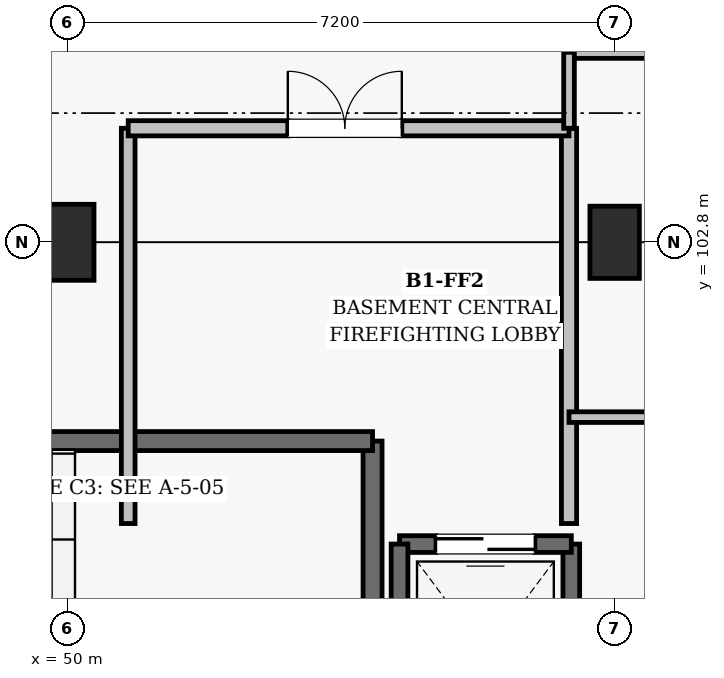
"""IFC4 building model, lengths in metres.
Left out: names, types, materials, properties, quantities, classifications, styles, units other than length and angle.
Written with IfcOpenShell. Run it as: python <this file> out.ifc"""

import sys

from ifc_helpers import new_model, si_unit, direction, frame, frame_2d, origin, origin_2d, place, context, subcontext, project, spatial, rectangle, extrude, element, fill, save


model = new_model("IFC4")
c1 = context("Model", 3, precision=1e-05, world=origin(), true_north=direction((0.0, 1.0)))
c2 = subcontext(c1, "Body", "Model", "MODEL_VIEW")
j1 = project(units=[si_unit("LENGTHUNIT", "METRE"), si_unit("PLANEANGLEUNIT", "RADIAN")], contexts=[c1])
p1 = place(None, origin())
s1 = spatial("IfcSite", under=j1, at=p1, CompositionType="ELEMENT")
p2 = place(p1, origin())
s2 = spatial("IfcBuilding", under=s1, at=p2, CompositionType="ELEMENT")
p3 = place(p2, frame((0.0, 0.0, -4.5)))
s3 = spatial("IfcBuildingStorey", under=s2, at=p3, CompositionType="ELEMENT", Elevation=-4.5)
p4 = place(p3, frame((50.0, 102.8, 0.0), z_axis=(0.0, 0.0, 1.0), x_axis=(1.0, 0.0, 0.0)))
e1 = element("IfcColumn", 1, at=p4, inside=s3, PredefinedType="COLUMN", context=c2, shape_type="SweptSolid", body=[
    extrude(rectangle(XDim=0.7, YDim=1.0, at=origin_2d()), origin(), (0.0, 0.0, 1.0), 4.5),
])
p5 = place(p3, frame((57.2, 102.8, 0.0), z_axis=(0.0, 0.0, 1.0), x_axis=(1.0, 0.0, 0.0)))
e2 = element("IfcColumn", 2, at=p5, inside=s3, PredefinedType="COLUMN", context=c2, shape_type="SweptSolid", body=[
    extrude(rectangle(XDim=0.65, YDim=0.95, at=origin_2d()), origin(), (0.0, 0.0, 1.0), 4.5),
])
p6 = place(p3, frame((54.015, 95.085, 0.0), z_axis=(0.0, 0.0, 1.0), x_axis=(0.0, 1.0, 0.0)))
e3 = element("IfcWall", 3, at=p6, inside=s3, PredefinedType="SHEAR", context=c2, shape_type="SweptSolid", body=[
    extrude(rectangle(XDim=5.1, YDim=0.25, at=frame_2d((2.55, 0.0))), origin(), (0.0, 0.0, 1.0), 4.215),
])
p7 = place(p3, frame((54.015, 100.185, 0.0), z_axis=(0.0, 0.0, 1.0), x_axis=(-1.0, 0.0, 0.0)))
e4 = element("IfcWall", 4, at=p7, inside=s3, PredefinedType="SHEAR", context=c2, shape_type="SweptSolid", body=[
    extrude(rectangle(XDim=10.63, YDim=0.25, at=frame_2d((5.315, 0.0))), origin(), (0.0, 0.0, 1.0), 4.215),
])
p8 = place(p7, frame((8.78, 0.0, 0.0)))
e5 = element("IfcOpeningElement", 5, at=p8, cuts=e4, PredefinedType="OPENING", context=c2, shape_type="SweptSolid", body=[
    extrude(rectangle(XDim=1.2, YDim=2.15, at=frame_2d((0.6, 1.075))), frame((0.0, 0.135, 0.0), z_axis=(0.0, -1.0, 0.0), x_axis=(1.0, 0.0, 0.0)), (0.0, 0.0, 1.0), 0.27),
])
p9 = place(p3, frame((56.63, 95.97, 0.0), z_axis=(0.0, 0.0, 1.0), x_axis=(0.0, 1.0, 0.0)))
e6 = element("IfcWall", 6, at=p9, inside=s3, PredefinedType="SHEAR", context=c2, shape_type="SweptSolid", body=[
    extrude(rectangle(XDim=2.86, YDim=0.22, at=frame_2d((1.43, 0.0))), origin(), (0.0, 0.0, 1.0), 4.215),
])
p10 = place(p3, frame((56.63, 98.83, 0.0), z_axis=(0.0, 0.0, 1.0), x_axis=(-1.0, 0.0, 0.0)))
e7 = element("IfcWall", 7, at=p10, inside=s3, PredefinedType="SHEAR", context=c2, shape_type="SweptSolid", body=[
    extrude(rectangle(XDim=2.26, YDim=0.22, at=frame_2d((1.13, 0.0))), origin(), (0.0, 0.0, 1.0), 4.215),
])
p11 = place(p10, frame((0.48, 0.0, 0.0)))
e8 = element("IfcOpeningElement", 8, at=p11, cuts=e7, PredefinedType="OPENING", context=c2, shape_type="SweptSolid", body=[
    extrude(rectangle(XDim=1.3, YDim=2.2, at=frame_2d((0.65, 1.1))), frame((0.0, 0.12, 0.0), z_axis=(0.0, -1.0, 0.0), x_axis=(1.0, 0.0, 0.0)), (0.0, 0.0, 1.0), 0.24),
])
p12 = place(p3, frame((54.37, 98.83, 0.0), z_axis=(0.0, 0.0, 1.0), x_axis=(0.0, -1.0, 0.0)))
e9 = element("IfcWall", 9, at=p12, inside=s3, PredefinedType="SHEAR", context=c2, shape_type="SweptSolid", body=[
    extrude(rectangle(XDim=2.86, YDim=0.22, at=frame_2d((1.43, 0.0))), origin(), (0.0, 0.0, 1.0), 4.215),
])
p13 = place(p3, frame((50.8, 99.1, 0.0), z_axis=(0.0, 0.0, 1.0), x_axis=(0.0, 1.0, 0.0)))
e10 = element("IfcWall", 10, at=p13, inside=s3, PredefinedType="SOLIDWALL", context=c2, shape_type="SweptSolid", body=[
    extrude(rectangle(XDim=5.2, YDim=0.18, at=frame_2d((2.6, 0.0))), origin(), (0.0, 0.0, 1.0), 3.36),
])
p14 = place(p3, frame((56.6, 99.1, 0.0), z_axis=(0.0, 0.0, 1.0), x_axis=(0.0, 1.0, 0.0)))
e11 = element("IfcWall", 11, at=p14, inside=s3, PredefinedType="SOLIDWALL", context=c2, shape_type="SweptSolid", body=[
    extrude(rectangle(XDim=5.2, YDim=0.2, at=frame_2d((2.6, 0.0))), origin(), (0.0, 0.0, 1.0), 3.36),
])
p15 = place(p3, frame((50.8, 104.3, 0.0), z_axis=(0.0, 0.0, 1.0), x_axis=(1.0, 0.0, 0.0)))
e12 = element("IfcWall", 12, at=p15, inside=s3, PredefinedType="SOLIDWALL", context=c2, shape_type="SweptSolid", body=[
    extrude(rectangle(XDim=5.8, YDim=0.2, at=frame_2d((2.9, 0.0))), origin(), (0.0, 0.0, 1.0), 3.56),
])
p16 = place(p15, frame((2.1, 0.0, 0.0)))
e13 = element("IfcOpeningElement", 13, at=p16, cuts=e12, PredefinedType="OPENING", context=c2, shape_type="SweptSolid", body=[
    extrude(rectangle(XDim=1.5, YDim=2.2, at=frame_2d((0.75, 1.1))), frame((0.0, 0.11, 0.0), z_axis=(0.0, -1.0, 0.0), x_axis=(1.0, 0.0, 0.0)), (0.0, 0.0, 1.0), 0.22),
])
p17 = place(p3, frame((56.6, 100.5, 0.0), z_axis=(0.0, 0.0, 1.0), x_axis=(1.0, 0.0, 0.0)))
e14 = element("IfcWall", 14, at=p17, inside=s3, PredefinedType="PARTITIONING", context=c2, shape_type="SweptSolid", body=[
    extrude(rectangle(XDim=21.8, YDim=0.14, at=frame_2d((10.9, 0.0))), origin(), (0.0, 0.0, 1.0), 2.96),
])
p18 = place(p3, frame((56.6, 105.3, 0.0), z_axis=(0.0, 0.0, 1.0), x_axis=(1.0, 0.0, 0.0)))
e15 = element("IfcWall", 15, at=p18, inside=s3, PredefinedType="PARTITIONING", context=c2, shape_type="SweptSolid", body=[
    extrude(rectangle(XDim=21.8, YDim=0.16, at=frame_2d((10.9, 0.0))), origin(), (0.0, 0.0, 1.0), 2.96),
])
p19 = place(p3, frame((56.6, 104.3, 0.0), z_axis=(0.0, 0.0, 1.0), x_axis=(0.0, 1.0, 0.0)))
e16 = element("IfcWall", 16, at=p19, inside=s3, PredefinedType="PARTITIONING", context=c2, shape_type="SweptSolid", body=[
    extrude(rectangle(XDim=1.0, YDim=0.14, at=frame_2d((0.5, 0.0))), origin(), (0.0, 0.0, 1.0), 4.12),
])
p20 = place(p11, origin())
e17 = element("IfcDoor", 17, at=p20, inside=s3, OperationType="DOUBLE_DOOR_SLIDING", PredefinedType="DOOR", context=c2, shape_type="SweptSolid", body=[
    extrude(rectangle(XDim=1.3, YDim=2.2, at=frame_2d((0.65, 1.1))), frame((0.0, 0.025, 0.0), z_axis=(0.0, -1.0, 0.0), x_axis=(1.0, 0.0, 0.0)), (0.0, 0.0, 1.0), 0.05),
])
fill(e8, e17)
p21 = place(p16, origin())
e18 = element("IfcDoor", 18, at=p21, inside=s3, OperationType="DOUBLE_DOOR_SINGLE_SWING", PredefinedType="DOOR", context=c2, shape_type="SweptSolid", body=[
    extrude(rectangle(XDim=1.5, YDim=2.2, at=frame_2d((0.75, 1.1))), frame((0.0, 0.025, 0.0), z_axis=(0.0, -1.0, 0.0), x_axis=(1.0, 0.0, 0.0)), (0.0, 0.0, 1.0), 0.05),
])
fill(e13, e18)
save(model, sys.argv[1])
